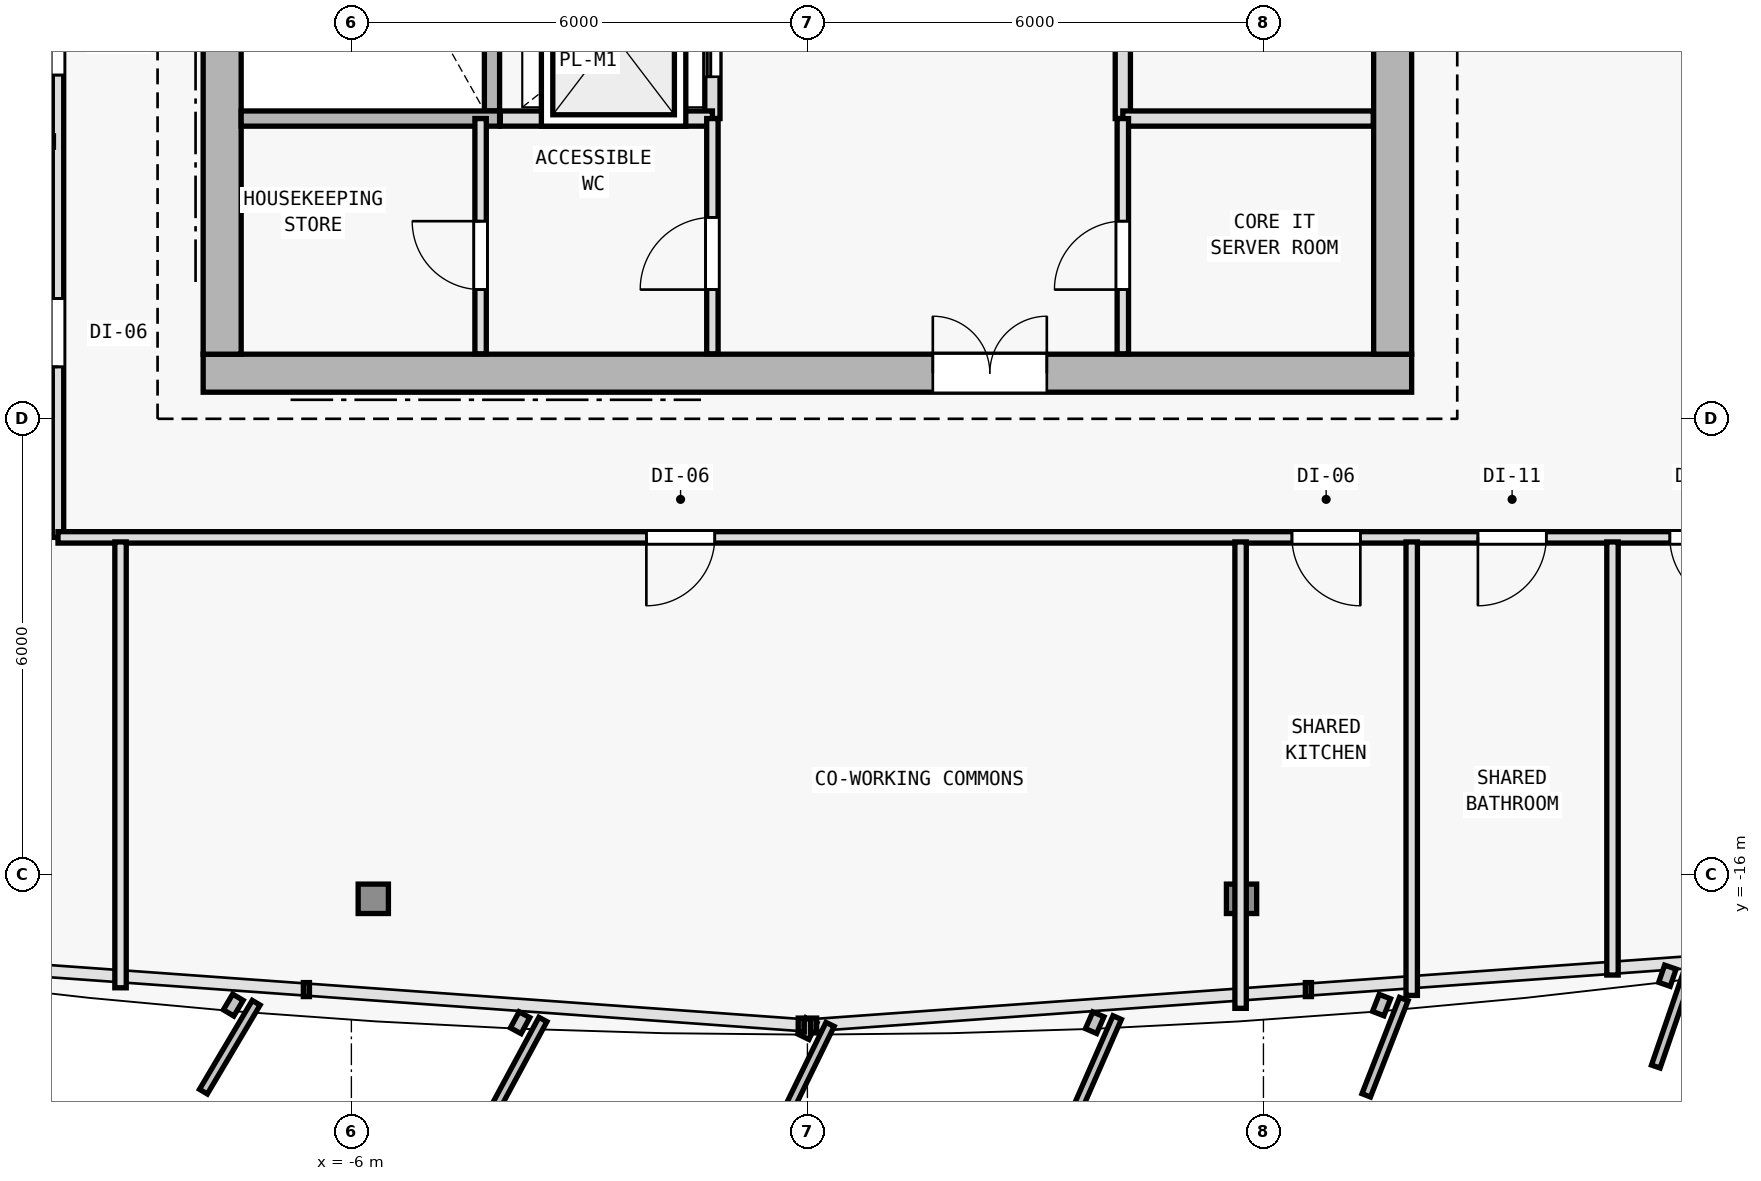
"""IFC4 building model, lengths in metres.
Left out: names, types, materials, properties, quantities, classifications, styles, units other than length and angle.
Written with IfcOpenShell. Run it as: python <this file> out.ifc"""

import sys

from ifc_helpers import new_model, si_unit, direction, frame, frame_2d, origin, origin_2d, place, context, subcontext, project, spatial, rectangle, i_section, extrude, element, fill, save


model = new_model("IFC4")
c1 = context("Model", 3, precision=1e-05, world=origin(), true_north=direction((0.0, 1.0)))
c2 = subcontext(c1, "Body", "Model", "MODEL_VIEW")
j1 = project(units=[si_unit("LENGTHUNIT", "METRE"), si_unit("PLANEANGLEUNIT", "RADIAN")], contexts=[c1])
p1 = place(None, origin())
s1 = spatial("IfcSite", under=j1, at=p1, CompositionType="ELEMENT")
p2 = place(p1, origin())
s2 = spatial("IfcBuilding", under=s1, at=p2, CompositionType="ELEMENT")
p3 = place(p2, frame((0.0, 0.0, 194.7)))
s3 = spatial("IfcBuildingStorey", under=s2, at=p3, CompositionType="ELEMENT", Elevation=194.7)
for number, where, z_axis, x_axis in (
    (1, (-7.7, -9.4, 0.0), (0.0, 0.0, 1.0), (1.0, 0.0, 0.0)),
    (2, (7.7, -9.4, 0.0), (0.0, 0.0, 1.0), (1.0, 0.0, 0.0)),
    (3, (0.0, -9.4, 0.0), (0.0, 0.0, 1.0), (1.0, 0.0, 0.0)),
):
    element("IfcColumn", number, at=place(p3, frame(where, z_axis=z_axis, x_axis=x_axis)), inside=s3, PredefinedType="COLUMN", context=c2, shape_type="SweptSolid", body=[
        extrude(i_section(OverallWidth=0.398, OverallDepth=0.387, WebThickness=0.013, FlangeThickness=0.022, FilletRadius=0.015, at=origin_2d()), origin(), (0.0, 0.0, 1.0), 3.6),
    ])
for number, where, z_axis, x_axis in (
    (4, (-5.712, -16.315, 0.006), (0.007, 0.035, 0.999), (-0.981, 0.193, 0.0)),
    (5, (5.712, -16.315, 0.006), (-0.007, 0.035, 0.999), (-0.981, -0.193, 0.0)),
):
    element("IfcColumn", number, at=place(p3, frame(where, z_axis=z_axis, x_axis=x_axis)), inside=s3, PredefinedType="COLUMN", context=c2, shape_type="SweptSolid", body=[
        extrude(i_section(OverallWidth=0.398, OverallDepth=0.387, WebThickness=0.013, FlangeThickness=0.022, FilletRadius=0.015, at=origin_2d()), origin(), (0.0, 0.0, 1.0), 3.591),
    ])
p4 = place(p3, frame((-7.95, -9.4, 0.0), z_axis=(0.0, 0.0, 1.0), x_axis=(1.0, 0.0, 0.0)))
e6 = element("IfcWall", 6, at=p4, inside=s3, PredefinedType="SHEAR", context=c2, shape_type="SweptSolid", body=[
    extrude(rectangle(XDim=15.9, YDim=0.5, at=frame_2d((7.95, 0.0))), origin(), (0.0, 0.0, 1.0), 3.35),
])
p5 = place(p4, frame((9.6, 0.0, 0.0)))
e7 = element("IfcOpeningElement", 7, at=p5, cuts=e6, PredefinedType="OPENING", context=c2, shape_type="SweptSolid", body=[
    extrude(rectangle(XDim=1.5, YDim=2.2, at=frame_2d((0.75, 1.1))), frame((0.0, 0.26, 0.0), z_axis=(0.0, -1.0, 0.0), x_axis=(1.0, 0.0, 0.0)), (0.0, 0.0, 1.0), 0.52),
])
p6 = place(p3, frame((-7.7, -9.15, 0.0), z_axis=(0.0, 0.0, 1.0), x_axis=(0.0, 1.0, 0.0)))
e8 = element("IfcWall", 8, at=p6, inside=s3, PredefinedType="SHEAR", context=c2, shape_type="SweptSolid", body=[
    extrude(rectangle(XDim=19.1, YDim=0.5, at=frame_2d((9.55, 0.0))), origin(), (0.0, 0.0, 1.0), 3.35),
])
p7 = place(p6, frame((12.7, 0.0, 0.0)))
e9 = element("IfcOpeningElement", 9, at=p7, cuts=e8, PredefinedType="OPENING", context=c2, shape_type="SweptSolid", body=[
    extrude(rectangle(XDim=1.1, YDim=2.15, at=frame_2d((0.55, 1.075))), frame((0.0, 0.26, 0.0), z_axis=(0.0, -1.0, 0.0), x_axis=(1.0, 0.0, 0.0)), (0.0, 0.0, 1.0), 0.52),
])
p8 = place(p3, frame((7.7, 9.95, 0.0), z_axis=(0.0, 0.0, 1.0), x_axis=(0.0, -1.0, 0.0)))
e10 = element("IfcWall", 10, at=p8, inside=s3, PredefinedType="SHEAR", context=c2, shape_type="SweptSolid", body=[
    extrude(rectangle(XDim=19.1, YDim=0.5, at=frame_2d((9.55, 0.0))), origin(), (0.0, 0.0, 1.0), 3.35),
])
p9 = place(p3, frame((-4.15, -5.95, 0.0), z_axis=(0.0, 0.0, 1.0), x_axis=(0.0, 1.0, 0.0)))
e11 = element("IfcWall", 11, at=p9, inside=s3, PredefinedType="SOLIDWALL", context=c2, shape_type="SweptSolid", body=[
    extrude(rectangle(XDim=7.2, YDim=0.2, at=frame_2d((3.6, 0.0))), origin(), (0.0, 0.0, 1.0), 3.35),
])
p10 = place(p3, frame((4.15, -6.05, 0.0), z_axis=(0.0, 0.0, 1.0), x_axis=(0.0, 1.0, 0.0)))
e12 = element("IfcWall", 12, at=p10, inside=s3, PredefinedType="SOLIDWALL", context=c2, shape_type="SweptSolid", body=[
    extrude(rectangle(XDim=8.7, YDim=0.2, at=frame_2d((4.35, 0.0))), origin(), (0.0, 0.0, 1.0), 3.35),
])
p11 = place(p10, frame((3.6, 0.0, 0.0)))
e13 = element("IfcOpeningElement", 13, at=p11, cuts=e12, PredefinedType="OPENING", context=c2, shape_type="SweptSolid", body=[
    extrude(rectangle(XDim=0.95, YDim=2.1, at=frame_2d((0.475, 1.05))), frame((0.0, 0.11, 0.0), z_axis=(0.0, -1.0, 0.0), x_axis=(1.0, 0.0, 0.0)), (0.0, 0.0, 1.0), 0.22),
])
p12 = place(p3, frame((-1.25, -6.05, 0.0), z_axis=(0.0, 0.0, 1.0), x_axis=(0.0, 1.0, 0.0)))
e14 = element("IfcWall", 14, at=p12, inside=s3, PredefinedType="SOLIDWALL", context=c2, shape_type="SweptSolid", body=[
    extrude(rectangle(XDim=8.7, YDim=0.2, at=frame_2d((4.35, 0.0))), origin(), (0.0, 0.0, 1.0), 3.35),
])
p13 = place(p12, frame((0.55, 0.0, 0.0)))
e15 = element("IfcOpeningElement", 15, at=p13, cuts=e14, PredefinedType="OPENING", context=c2, shape_type="SweptSolid", body=[
    extrude(rectangle(XDim=1.1, YDim=2.15, at=frame_2d((0.55, 1.075))), frame((0.0, 0.11, 0.0), z_axis=(0.0, -1.0, 0.0), x_axis=(1.0, 0.0, 0.0)), (0.0, 0.0, 1.0), 0.22),
])
p14 = place(p12, frame((2.65, 0.0, 0.0)))
e16 = element("IfcOpeningElement", 16, at=p14, cuts=e14, PredefinedType="OPENING", context=c2, shape_type="SweptSolid", body=[
    extrude(rectangle(XDim=1.1, YDim=2.15, at=frame_2d((0.55, 1.075))), frame((0.0, 0.11, 0.0), z_axis=(0.0, -1.0, 0.0), x_axis=(1.0, 0.0, 0.0)), (0.0, 0.0, 1.0), 0.22),
])
p15 = place(p12, frame((4.75, 0.0, 0.0)))
e17 = element("IfcOpeningElement", 17, at=p15, cuts=e14, PredefinedType="OPENING", context=c2, shape_type="SweptSolid", body=[
    extrude(rectangle(XDim=1.1, YDim=2.15, at=frame_2d((0.55, 1.075))), frame((0.0, 0.11, 0.0), z_axis=(0.0, -1.0, 0.0), x_axis=(1.0, 0.0, 0.0)), (0.0, 0.0, 1.0), 0.22),
])
p16 = place(p12, frame((6.85, 0.0, 0.0)))
e18 = element("IfcOpeningElement", 18, at=p16, cuts=e14, PredefinedType="OPENING", context=c2, shape_type="SweptSolid", body=[
    extrude(rectangle(XDim=1.1, YDim=2.15, at=frame_2d((0.55, 1.075))), frame((0.0, 0.11, 0.0), z_axis=(0.0, -1.0, 0.0), x_axis=(1.0, 0.0, 0.0)), (0.0, 0.0, 1.0), 0.22),
])
p17 = place(p3, frame((-7.45, -6.05, 0.0), z_axis=(0.0, 0.0, 1.0), x_axis=(1.0, 0.0, 0.0)))
e19 = element("IfcWall", 19, at=p17, inside=s3, PredefinedType="SOLIDWALL", context=c2, shape_type="SweptSolid", body=[
    extrude(rectangle(XDim=3.4, YDim=0.2, at=frame_2d((1.7, 0.0))), origin(), (0.0, 0.0, 1.0), 3.35),
])
p18 = place(p3, frame((-4.04, -6.05, 0.0), z_axis=(0.0, 0.0, 1.0), x_axis=(1.0, 0.0, 0.0)))
e20 = element("IfcWall", 20, at=p18, inside=s3, PredefinedType="SOLIDWALL", context=c2, shape_type="SweptSolid", body=[
    extrude(rectangle(XDim=2.79, YDim=0.2, at=frame_2d((1.395, 0.0))), origin(), (0.0, 0.0, 1.0), 3.35),
])
p19 = place(p3, frame((4.15, -6.05, 0.0), z_axis=(0.0, 0.0, 1.0), x_axis=(1.0, 0.0, 0.0)))
e21 = element("IfcWall", 21, at=p19, inside=s3, PredefinedType="SOLIDWALL", context=c2, shape_type="SweptSolid", body=[
    extrude(rectangle(XDim=3.295, YDim=0.2, at=frame_2d((1.647, 0.0))), origin(), (0.0, 0.0, 1.0), 3.35),
])
p20 = place(p3, frame((-1.25, -9.145, 0.0), z_axis=(0.0, 0.0, 1.0), x_axis=(0.0, 1.0, 0.0)))
e22 = element("IfcWall", 22, at=p20, inside=s3, PredefinedType="PARTITIONING", context=c2, shape_type="SweptSolid", body=[
    extrude(rectangle(XDim=3.095, YDim=0.15, at=frame_2d((1.547, 0.0))), origin(), (0.0, 0.0, 1.0), 3.35),
])
p21 = place(p20, frame((0.845, 0.0, 0.0)))
e23 = element("IfcOpeningElement", 23, at=p21, cuts=e22, PredefinedType="OPENING", context=c2, shape_type="SweptSolid", body=[
    extrude(rectangle(XDim=0.95, YDim=2.1, at=frame_2d((0.475, 1.05))), frame((0.0, 0.085, 0.0), z_axis=(0.0, -1.0, 0.0), x_axis=(1.0, 0.0, 0.0)), (0.0, 0.0, 1.0), 0.17),
])
p22 = place(p3, frame((4.15, -9.145, 0.0), z_axis=(0.0, 0.0, 1.0), x_axis=(0.0, 1.0, 0.0)))
e24 = element("IfcWall", 24, at=p22, inside=s3, PredefinedType="PARTITIONING", context=c2, shape_type="SweptSolid", body=[
    extrude(rectangle(XDim=3.095, YDim=0.15, at=frame_2d((1.547, 0.0))), origin(), (0.0, 0.0, 1.0), 3.35),
])
p23 = place(p22, frame((0.845, 0.0, 0.0)))
e25 = element("IfcOpeningElement", 25, at=p23, cuts=e24, PredefinedType="OPENING", context=c2, shape_type="SweptSolid", body=[
    extrude(rectangle(XDim=0.9, YDim=2.1, at=frame_2d((0.45, 1.05))), frame((0.0, 0.085, 0.0), z_axis=(0.0, -1.0, 0.0), x_axis=(1.0, 0.0, 0.0)), (0.0, 0.0, 1.0), 0.17),
])
p24 = place(p3, frame((-4.3, -9.145, 0.0), z_axis=(0.0, 0.0, 1.0), x_axis=(0.0, 1.0, 0.0)))
e26 = element("IfcWall", 26, at=p24, inside=s3, PredefinedType="PARTITIONING", context=c2, shape_type="SweptSolid", body=[
    extrude(rectangle(XDim=3.095, YDim=0.15, at=frame_2d((1.547, 0.0))), origin(), (0.0, 0.0, 1.0), 3.35),
])
p25 = place(p24, frame((0.845, 0.0, 0.0)))
e27 = element("IfcOpeningElement", 27, at=p25, cuts=e26, PredefinedType="OPENING", context=c2, shape_type="SweptSolid", body=[
    extrude(rectangle(XDim=0.9, YDim=2.1, at=frame_2d((0.45, 1.05))), frame((0.0, 0.085, 0.0), z_axis=(0.0, -1.0, 0.0), x_axis=(1.0, 0.0, 0.0)), (0.0, 0.0, 1.0), 0.17),
])
p26 = place(p3, frame((-9.86, -11.56, 0.0), z_axis=(0.0, 0.0, 1.0), x_axis=(0.0, 1.0, 0.0)))
e28 = element("IfcWall", 28, at=p26, inside=s3, PredefinedType="PARTITIONING", context=c2, shape_type="SweptSolid", body=[
    extrude(rectangle(XDim=19.986, YDim=0.15, at=frame_2d((9.993, 0.0))), origin(), (0.0, 0.0, 1.0), 2.825),
])
p27 = place(p26, frame((10.94, 0.0, 0.0)))
e29 = element("IfcOpeningElement", 29, at=p27, cuts=e28, PredefinedType="OPENING", context=c2, shape_type="SweptSolid", body=[
    extrude(rectangle(XDim=0.9, YDim=2.1, at=frame_2d((0.45, 1.05))), frame((0.0, 0.085, 0.0), z_axis=(0.0, -1.0, 0.0), x_axis=(1.0, 0.0, 0.0)), (0.0, 0.0, 1.0), 0.17),
])
p28 = place(p26, frame((8.643, 0.0, 0.0)))
e30 = element("IfcOpeningElement", 30, at=p28, cuts=e28, PredefinedType="OPENING", context=c2, shape_type="SweptSolid", body=[
    extrude(rectangle(XDim=0.9, YDim=2.1, at=frame_2d((0.45, 1.05))), frame((0.0, 0.085, 0.0), z_axis=(0.0, -1.0, 0.0), x_axis=(1.0, 0.0, 0.0)), (0.0, 0.0, 1.0), 0.17),
])
p29 = place(p26, frame((6.082, 0.0, 0.0)))
e31 = element("IfcOpeningElement", 31, at=p29, cuts=e28, PredefinedType="OPENING", context=c2, shape_type="SweptSolid", body=[
    extrude(rectangle(XDim=0.9, YDim=2.1, at=frame_2d((0.45, 1.05))), frame((0.0, 0.085, 0.0), z_axis=(0.0, -1.0, 0.0), x_axis=(1.0, 0.0, 0.0)), (0.0, 0.0, 1.0), 0.17),
])
p30 = place(p26, frame((2.243, 0.0, 0.0)))
e32 = element("IfcOpeningElement", 32, at=p30, cuts=e28, PredefinedType="OPENING", context=c2, shape_type="SweptSolid", body=[
    extrude(rectangle(XDim=0.9, YDim=2.1, at=frame_2d((0.45, 1.05))), frame((0.0, 0.085, 0.0), z_axis=(0.0, -1.0, 0.0), x_axis=(1.0, 0.0, 0.0)), (0.0, 0.0, 1.0), 0.17),
])
p31 = place(p26, frame((17.092, 0.0, 0.0)))
e33 = element("IfcOpeningElement", 33, at=p31, cuts=e28, PredefinedType="OPENING", context=c2, shape_type="SweptSolid", body=[
    extrude(rectangle(XDim=0.9, YDim=2.1, at=frame_2d((0.45, 1.05))), frame((0.0, 0.085, 0.0), z_axis=(0.0, -1.0, 0.0), x_axis=(1.0, 0.0, 0.0)), (0.0, 0.0, 1.0), 0.17),
])
p32 = place(p26, frame((13.413, 0.0, 0.0)))
e34 = element("IfcOpeningElement", 34, at=p32, cuts=e28, PredefinedType="OPENING", context=c2, shape_type="SweptSolid", body=[
    extrude(rectangle(XDim=0.9, YDim=2.1, at=frame_2d((0.45, 1.05))), frame((0.0, 0.085, 0.0), z_axis=(0.0, -1.0, 0.0), x_axis=(1.0, 0.0, 0.0)), (0.0, 0.0, 1.0), 0.17),
])
p33 = place(p3, frame((13.18, -11.56, 0.0), z_axis=(0.0, 0.0, 1.0), x_axis=(-1.0, 0.0, 0.0)))
e35 = element("IfcWall", 35, at=p33, inside=s3, PredefinedType="PARTITIONING", context=c2, shape_type="SweptSolid", body=[
    extrude(rectangle(XDim=23.04, YDim=0.15, at=frame_2d((11.52, 0.0))), origin(), (0.0, 0.0, 1.0), 2.825),
])
p34 = place(p33, frame((14.399, 0.0, 0.0)))
e36 = element("IfcOpeningElement", 36, at=p34, cuts=e35, PredefinedType="OPENING", context=c2, shape_type="SweptSolid", body=[
    extrude(rectangle(XDim=0.9, YDim=2.1, at=frame_2d((0.45, 1.05))), frame((0.0, 0.085, 0.0), z_axis=(0.0, -1.0, 0.0), x_axis=(1.0, 0.0, 0.0)), (0.0, 0.0, 1.0), 0.17),
])
p35 = place(p33, frame((5.905, 0.0, 0.0)))
e37 = element("IfcOpeningElement", 37, at=p35, cuts=e35, PredefinedType="OPENING", context=c2, shape_type="SweptSolid", body=[
    extrude(rectangle(XDim=0.9, YDim=2.1, at=frame_2d((0.45, 1.05))), frame((0.0, 0.085, 0.0), z_axis=(0.0, -1.0, 0.0), x_axis=(1.0, 0.0, 0.0)), (0.0, 0.0, 1.0), 0.17),
])
p36 = place(p33, frame((3.458, 0.0, 0.0)))
e38 = element("IfcOpeningElement", 38, at=p36, cuts=e35, PredefinedType="OPENING", context=c2, shape_type="SweptSolid", body=[
    extrude(rectangle(XDim=0.9, YDim=2.1, at=frame_2d((0.45, 1.05))), frame((0.0, 0.085, 0.0), z_axis=(0.0, -1.0, 0.0), x_axis=(1.0, 0.0, 0.0)), (0.0, 0.0, 1.0), 0.17),
])
p37 = place(p33, frame((0.933, 0.0, 0.0)))
e39 = element("IfcOpeningElement", 39, at=p37, cuts=e35, PredefinedType="OPENING", context=c2, shape_type="SweptSolid", body=[
    extrude(rectangle(XDim=0.9, YDim=2.1, at=frame_2d((0.45, 1.05))), frame((0.0, 0.085, 0.0), z_axis=(0.0, -1.0, 0.0), x_axis=(1.0, 0.0, 0.0)), (0.0, 0.0, 1.0), 0.17),
])
p38 = place(p3, frame((5.699, -11.62, 0.0), z_axis=(0.0, 0.0, 1.0), x_axis=(0.0, -1.0, 0.0)))
e40 = element("IfcWall", 40, at=p38, inside=s3, PredefinedType="PARTITIONING", context=c2, shape_type="SweptSolid", body=[
    extrude(rectangle(XDim=6.136, YDim=0.15, at=frame_2d((3.068, 0.0))), origin(), (0.0, 0.0, 1.0), 2.775),
])
p39 = place(p3, frame((-9.92, -6.352, 0.0), z_axis=(0.0, 0.0, 1.0), x_axis=(-1.0, 0.0, 0.0)))
e41 = element("IfcWall", 41, at=p39, inside=s3, PredefinedType="PARTITIONING", context=c2, shape_type="SweptSolid", body=[
    extrude(rectangle(XDim=11.486, YDim=0.15, at=frame_2d((5.743, 0.0))), origin(), (0.0, 0.0, 1.0), 2.825),
])
p40 = place(p3, frame((10.593, -11.62, 0.0), z_axis=(0.0, 0.0, 1.0), x_axis=(0.0, -1.0, 0.0)))
e42 = element("IfcWall", 42, at=p40, inside=s3, PredefinedType="PARTITIONING", context=c2, shape_type="SweptSolid", body=[
    extrude(rectangle(XDim=5.698, YDim=0.15, at=frame_2d((2.849, 0.0))), origin(), (0.0, 0.0, 1.0), 2.775),
])
p41 = place(p3, frame((-9.037, -11.62, 0.0), z_axis=(0.0, 0.0, 1.0), x_axis=(0.0, -1.0, 0.0)))
e43 = element("IfcWall", 43, at=p41, inside=s3, PredefinedType="PARTITIONING", context=c2, shape_type="SweptSolid", body=[
    extrude(rectangle(XDim=5.865, YDim=0.15, at=frame_2d((2.933, 0.0))), origin(), (0.0, 0.0, 1.0), 2.935),
])
p42 = place(p3, frame((7.951, -11.62, 0.0), z_axis=(0.0, 0.0, 1.0), x_axis=(0.0, -1.0, 0.0)))
e44 = element("IfcWall", 44, at=p42, inside=s3, PredefinedType="PARTITIONING", context=c2, shape_type="SweptSolid", body=[
    extrude(rectangle(XDim=5.966, YDim=0.15, at=frame_2d((2.983, 0.0))), origin(), (0.0, 0.0, 1.0), 2.775),
])
p43 = place(p5, origin())
e45 = element("IfcDoor", 45, at=p43, inside=s3, OperationType="DOUBLE_DOOR_SINGLE_SWING", PredefinedType="DOOR", context=c2, shape_type="SweptSolid", body=[
    extrude(rectangle(XDim=1.5, YDim=2.2, at=frame_2d((0.75, 1.1))), frame((0.0, 0.025, 0.0), z_axis=(0.0, -1.0, 0.0), x_axis=(1.0, 0.0, 0.0)), (0.0, 0.0, 1.0), 0.05),
])
fill(e7, e45)
p44 = place(p13, origin())
e46 = element("IfcDoor", 46, at=p44, inside=s3, OperationType="DOUBLE_DOOR_SLIDING", PredefinedType="DOOR", context=c2, shape_type="SweptSolid", body=[
    extrude(rectangle(XDim=1.1, YDim=2.15, at=frame_2d((0.55, 1.075))), frame((0.0, 0.025, 0.0), z_axis=(0.0, -1.0, 0.0), x_axis=(1.0, 0.0, 0.0)), (0.0, 0.0, 1.0), 0.05),
])
fill(e15, e46)
p45 = place(p21, origin())
e47 = element("IfcDoor", 47, at=p45, inside=s3, OperationType="SINGLE_SWING_LEFT", PredefinedType="DOOR", context=c2, shape_type="SweptSolid", body=[
    extrude(rectangle(XDim=0.95, YDim=2.1, at=frame_2d((0.475, 1.05))), frame((0.0, 0.025, 0.0), z_axis=(0.0, -1.0, 0.0), x_axis=(1.0, 0.0, 0.0)), (0.0, 0.0, 1.0), 0.05),
])
fill(e23, e47)
p46 = place(p25, origin())
e48 = element("IfcDoor", 48, at=p46, inside=s3, OperationType="SINGLE_SWING_RIGHT", PredefinedType="DOOR", context=c2, shape_type="SweptSolid", body=[
    extrude(rectangle(XDim=0.9, YDim=2.1, at=frame_2d((0.45, 1.05))), frame((0.0, 0.025, 0.0), z_axis=(0.0, -1.0, 0.0), x_axis=(1.0, 0.0, 0.0)), (0.0, 0.0, 1.0), 0.05),
])
fill(e27, e48)
p47 = place(p23, origin())
e49 = element("IfcDoor", 49, at=p47, inside=s3, OperationType="SINGLE_SWING_LEFT", PredefinedType="DOOR", context=c2, shape_type="SweptSolid", body=[
    extrude(rectangle(XDim=0.9, YDim=2.1, at=frame_2d((0.45, 1.05))), frame((0.0, 0.025, 0.0), z_axis=(0.0, -1.0, 0.0), x_axis=(1.0, 0.0, 0.0)), (0.0, 0.0, 1.0), 0.05),
])
fill(e25, e49)
p48 = place(p29, origin())
e50 = element("IfcDoor", 50, at=p48, inside=s3, OperationType="SINGLE_SWING_RIGHT", PredefinedType="DOOR", context=c2, shape_type="SweptSolid", body=[
    extrude(rectangle(XDim=0.9, YDim=2.1, at=frame_2d((0.45, 1.05))), frame((0.0, 0.025, 0.0), z_axis=(0.0, -1.0, 0.0), x_axis=(1.0, 0.0, 0.0)), (0.0, 0.0, 1.0), 0.05),
])
fill(e31, e50)
p49 = place(p30, origin())
e51 = element("IfcDoor", 51, at=p49, inside=s3, OperationType="SINGLE_SWING_LEFT", PredefinedType="DOOR", context=c2, shape_type="SweptSolid", body=[
    extrude(rectangle(XDim=0.9, YDim=2.1, at=frame_2d((0.45, 1.05))), frame((0.0, 0.025, 0.0), z_axis=(0.0, -1.0, 0.0), x_axis=(1.0, 0.0, 0.0)), (0.0, 0.0, 1.0), 0.05),
])
fill(e32, e51)
p50 = place(p34, origin())
e52 = element("IfcDoor", 52, at=p50, inside=s3, OperationType="SINGLE_SWING_RIGHT", PredefinedType="DOOR", context=c2, shape_type="SweptSolid", body=[
    extrude(rectangle(XDim=0.9, YDim=2.1, at=frame_2d((0.45, 1.05))), frame((0.0, 0.025, 0.0), z_axis=(0.0, -1.0, 0.0), x_axis=(1.0, 0.0, 0.0)), (0.0, 0.0, 1.0), 0.05),
])
fill(e36, e52)
p51 = place(p35, origin())
e53 = element("IfcDoor", 53, at=p51, inside=s3, OperationType="SINGLE_SWING_LEFT", PredefinedType="DOOR", context=c2, shape_type="SweptSolid", body=[
    extrude(rectangle(XDim=0.9, YDim=2.1, at=frame_2d((0.45, 1.05))), frame((0.0, 0.025, 0.0), z_axis=(0.0, -1.0, 0.0), x_axis=(1.0, 0.0, 0.0)), (0.0, 0.0, 1.0), 0.05),
])
fill(e37, e53)
p52 = place(p36, origin())
e54 = element("IfcDoor", 54, at=p52, inside=s3, OperationType="SINGLE_SWING_RIGHT", PredefinedType="DOOR", context=c2, shape_type="SweptSolid", body=[
    extrude(rectangle(XDim=0.9, YDim=2.1, at=frame_2d((0.45, 1.05))), frame((0.0, 0.025, 0.0), z_axis=(0.0, -1.0, 0.0), x_axis=(1.0, 0.0, 0.0)), (0.0, 0.0, 1.0), 0.05),
])
fill(e38, e54)
p53 = place(p37, origin())
e55 = element("IfcDoor", 55, at=p53, inside=s3, OperationType="SINGLE_SWING_LEFT", PredefinedType="DOOR", context=c2, shape_type="SweptSolid", body=[
    extrude(rectangle(XDim=0.9, YDim=2.1, at=frame_2d((0.45, 1.05))), frame((0.0, 0.025, 0.0), z_axis=(0.0, -1.0, 0.0), x_axis=(1.0, 0.0, 0.0)), (0.0, 0.0, 1.0), 0.05),
])
fill(e39, e55)
save(model, sys.argv[1])
